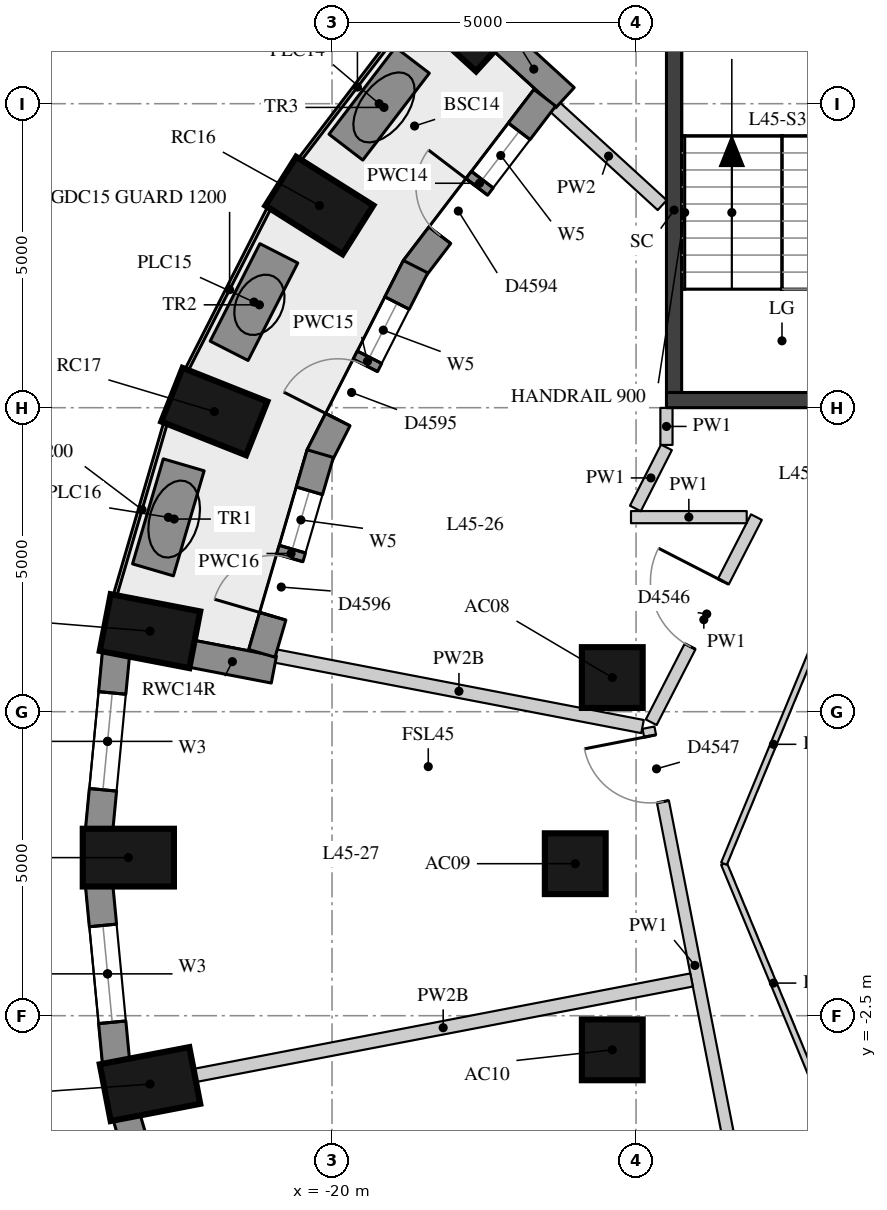
"""IFC4 building model, lengths in metres.
Left out: names, types, materials, properties, quantities, classifications, styles, units other than length and angle.
Written with IfcOpenShell. Run it as: python <this file> out.ifc"""

import sys

from ifc_helpers import new_model, si_unit, direction, frame, frame_2d, origin, origin_2d, place, context, subcontext, project, spatial, rectangle, extrude, element, fill, save


model = new_model("IFC4")
c1 = context("Model", 3, precision=1e-05, world=origin(), true_north=direction((0.0, 1.0)))
c2 = subcontext(c1, "Body", "Model", "MODEL_VIEW")
j1 = project(units=[si_unit("LENGTHUNIT", "METRE"), si_unit("PLANEANGLEUNIT", "RADIAN")], contexts=[c1])
p1 = place(None, origin())
s1 = spatial("IfcSite", under=j1, at=p1, CompositionType="ELEMENT")
p2 = place(p1, origin())
s2 = spatial("IfcBuilding", under=s1, at=p2, CompositionType="ELEMENT")
p3 = place(p2, frame((0.0, 0.0, 161.6)))
s3 = spatial("IfcBuildingStorey", under=s2, at=p3, CompositionType="ELEMENT", Elevation=161.6)
for number, where, z_axis, x_axis in (
    (1, (-17.864, 13.888, 0.0), (0.0, 0.0, 1.0), (-0.738, 0.675, 0.0)),
    (2, (-20.208, 10.825, 0.0), (0.0, 0.0, 1.0), (-0.846, 0.533, 0.0)),
    (3, (-21.936, 7.436, 0.0), (0.0, 0.0, 1.0), (-0.93, 0.369, 0.0)),
    (4, (-22.994, 3.825, 0.0), (0.0, 0.0, 1.0), (-0.982, 0.189, 0.0)),
    (5, (-23.35, 0.1, 0.0), (0.0, 0.0, 1.0), (-1.0, 0.0, 0.0)),
    (6, (-22.994, -3.625, 0.0), (0.0, 0.0, 1.0), (-0.982, -0.189, 0.0)),
):
    element("IfcColumn", number, at=place(p3, frame(where, z_axis=z_axis, x_axis=x_axis)), inside=s3, PredefinedType="COLUMN", context=c2, shape_type="SweptSolid", body=[
        extrude(rectangle(XDim=1.5, YDim=0.95, at=origin_2d()), origin(), (0.0, 0.0, 1.0), 3.3),
    ])
for number, where, z_axis, x_axis in (
    (7, (-15.391, 3.062, 0.0), (0.0, 0.0, 1.0), (1.0, 0.0, 0.0)),
    (8, (-16.0, 0.0, 0.0), (0.0, 0.0, 1.0), (1.0, 0.0, 0.0)),
    (9, (-15.391, -3.062, 0.0), (0.0, 0.0, 1.0), (1.0, 0.0, 0.0)),
):
    element("IfcColumn", number, at=place(p3, frame(where, z_axis=z_axis, x_axis=x_axis)), inside=s3, PredefinedType="COLUMN", context=c2, shape_type="SweptSolid", body=[
        extrude(rectangle(XDim=1.0, YDim=1.0, at=origin_2d()), origin(), (0.0, 0.0, 1.0), 3.3),
    ])
p4 = place(p3, frame((-23.552, 3.469, 0.0), z_axis=(0.0, 0.0, 1.0), x_axis=(-0.095265737322, -0.995451876935, 0.0)))
e10 = element("IfcWall", 10, at=p4, inside=s3, PredefinedType="SOLIDWALL", context=c2, shape_type="SweptSolid", body=[
    extrude(rectangle(XDim=2.927, YDim=0.45, at=frame_2d((1.463, 0.0))), origin(), (0.0, 0.0, 1.0), 3.02),
])
p5 = place(p4, frame((0.663, 0.0, 0.4)))
e11 = element("IfcOpeningElement", 11, at=p5, cuts=e10, PredefinedType="OPENING", context=c2, shape_type="SweptSolid", body=[
    extrude(rectangle(XDim=1.6, YDim=1.75, at=frame_2d((0.8, 0.875))), frame((0.0, 0.235, 0.0), z_axis=(0.0, -1.0, 0.0), x_axis=(1.0, 0.0, 0.0)), (0.0, 0.0, 1.0), 0.47),
])
p6 = place(p3, frame((-23.831, -0.355, 0.0), z_axis=(0.0, 0.0, 1.0), x_axis=(0.095257827044, -0.995452633924, 0.0)))
e12 = element("IfcWall", 12, at=p6, inside=s3, PredefinedType="SOLIDWALL", context=c2, shape_type="SweptSolid", body=[
    extrude(rectangle(XDim=2.927, YDim=0.45, at=frame_2d((1.463, 0.0))), origin(), (0.0, 0.0, 1.0), 3.02),
])
p7 = place(p6, frame((0.663, 0.0, 0.4)))
e13 = element("IfcOpeningElement", 13, at=p7, cuts=e12, PredefinedType="OPENING", context=c2, shape_type="SweptSolid", body=[
    extrude(rectangle(XDim=1.6, YDim=1.75, at=frame_2d((0.8, 0.875))), frame((0.0, 0.235, 0.0), z_axis=(0.0, -1.0, 0.0), x_axis=(1.0, 0.0, 0.0)), (0.0, 0.0, 1.0), 0.47),
])
p8 = place(p3, frame((-23.38, -4.162, 0.0), z_axis=(0.0, 0.0, 1.0), x_axis=(0.281125768296, -0.959670934435, 0.0)))
e14 = element("IfcWall", 14, at=p8, inside=s3, PredefinedType="SOLIDWALL", context=c2, shape_type="SweptSolid", body=[
    extrude(rectangle(XDim=2.948, YDim=0.45, at=frame_2d((1.474, 0.0))), origin(), (0.0, 0.0, 1.0), 3.02),
])
p9 = place(p8, frame((0.674, 0.0, 0.4)))
e15 = element("IfcOpeningElement", 15, at=p9, cuts=e14, PredefinedType="OPENING", context=c2, shape_type="SweptSolid", body=[
    extrude(rectangle(XDim=1.6, YDim=1.75, at=frame_2d((0.8, 0.875))), frame((0.0, 0.235, 0.0), z_axis=(0.0, -1.0, 0.0), x_axis=(1.0, 0.0, 0.0)), (0.0, 0.0, 1.0), 0.47),
])
p10 = place(p3, frame((-17.195, 13.537, 0.0), z_axis=(0.0, 0.0, 1.0), x_axis=(0.737918885826, -0.674889411638, 0.0)))
e16 = element("IfcWall", 16, at=p10, inside=s3, PredefinedType="SOLIDWALL", context=c2, shape_type="SweptSolid", body=[
    extrude(rectangle(XDim=1.391, YDim=0.45, at=frame_2d((0.695, 0.0))), origin(), (0.0, 0.0, 1.0), 3.02),
])
p11 = place(p3, frame((-22.322, 3.455, 0.0), z_axis=(0.0, 0.0, 1.0), x_axis=(0.982051513278, -0.188612897936, 0.0)))
e17 = element("IfcWall", 17, at=p11, inside=s3, PredefinedType="SOLIDWALL", context=c2, shape_type="SweptSolid", body=[
    extrude(rectangle(XDim=1.39, YDim=0.45, at=frame_2d((0.695, 0.0))), origin(), (0.0, 0.0, 1.0), 2.57),
])
p12 = place(p3, frame((-16.501, 12.598, 0.0), z_axis=(0.0, 0.0, 1.0), x_axis=(-0.606778881252, -0.794870674554, 0.0)))
e18 = element("IfcWall", 18, at=p12, inside=s3, PredefinedType="SOLIDWALL", context=c2, shape_type="SweptSolid", body=[
    extrude(rectangle(XDim=3.538, YDim=0.45, at=frame_2d((1.769, 0.0))), origin(), (0.0, 0.0, 1.0), 3.02),
])
p13 = place(p12, frame((0.694, 0.0, 0.4)))
e19 = element("IfcOpeningElement", 19, at=p13, cuts=e18, PredefinedType="OPENING", context=c2, shape_type="SweptSolid", body=[
    extrude(rectangle(XDim=1.0, YDim=1.75, at=frame_2d((0.5, 0.875))), frame((0.0, 0.235, 0.0), z_axis=(0.0, -1.0, 0.0), x_axis=(1.0, 0.0, 0.0)), (0.0, 0.0, 1.0), 0.47),
])
p14 = place(p12, frame((1.844, 0.0, 0.0)))
e20 = element("IfcOpeningElement", 20, at=p14, cuts=e18, PredefinedType="OPENING", context=c2, shape_type="SweptSolid", body=[
    extrude(rectangle(XDim=1.0, YDim=2.15, at=frame_2d((0.5, 1.075))), frame((0.0, 0.235, 0.0), z_axis=(0.0, -1.0, 0.0), x_axis=(1.0, 0.0, 0.0)), (0.0, 0.0, 1.0), 0.47),
])
p15 = place(p3, frame((-18.626, 9.82, 0.0), z_axis=(0.0, 0.0, 1.0), x_axis=(-0.453241970186, -0.891387523169, 0.0)))
e21 = element("IfcWall", 21, at=p15, inside=s3, PredefinedType="SOLIDWALL", context=c2, shape_type="SweptSolid", body=[
    extrude(rectangle(XDim=3.493, YDim=0.45, at=frame_2d((1.747, 0.0))), origin(), (0.0, 0.0, 1.0), 3.02),
])
p16 = place(p15, frame((0.672, 0.0, 0.4)))
e22 = element("IfcOpeningElement", 22, at=p16, cuts=e21, PredefinedType="OPENING", context=c2, shape_type="SweptSolid", body=[
    extrude(rectangle(XDim=1.0, YDim=1.75, at=frame_2d((0.5, 0.875))), frame((0.0, 0.235, 0.0), z_axis=(0.0, -1.0, 0.0), x_axis=(1.0, 0.0, 0.0)), (0.0, 0.0, 1.0), 0.47),
])
p17 = place(p15, frame((1.822, 0.0, 0.0)))
e23 = element("IfcOpeningElement", 23, at=p17, cuts=e21, PredefinedType="OPENING", context=c2, shape_type="SweptSolid", body=[
    extrude(rectangle(XDim=1.0, YDim=2.15, at=frame_2d((0.5, 1.075))), frame((0.0, 0.235, 0.0), z_axis=(0.0, -1.0, 0.0), x_axis=(1.0, 0.0, 0.0)), (0.0, 0.0, 1.0), 0.47),
])
p18 = place(p3, frame((-20.194, 6.745, 0.0), z_axis=(0.0, 0.0, 1.0), x_axis=(-0.280397139934, -0.959884078375, 0.0)))
e24 = element("IfcWall", 24, at=p18, inside=s3, PredefinedType="SOLIDWALL", context=c2, shape_type="SweptSolid", body=[
    extrude(rectangle(XDim=3.423, YDim=0.45, at=frame_2d((1.711, 0.0))), origin(), (0.0, 0.0, 1.0), 3.02),
])
p19 = place(p18, frame((0.636, 0.0, 0.4)))
e25 = element("IfcOpeningElement", 25, at=p19, cuts=e24, PredefinedType="OPENING", context=c2, shape_type="SweptSolid", body=[
    extrude(rectangle(XDim=1.0, YDim=1.75, at=frame_2d((0.5, 0.875))), frame((0.0, 0.235, 0.0), z_axis=(0.0, -1.0, 0.0), x_axis=(1.0, 0.0, 0.0)), (0.0, 0.0, 1.0), 0.47),
])
p20 = place(p18, frame((1.786, 0.0, 0.0)))
e26 = element("IfcOpeningElement", 26, at=p20, cuts=e24, PredefinedType="OPENING", context=c2, shape_type="SweptSolid", body=[
    extrude(rectangle(XDim=1.0, YDim=2.15, at=frame_2d((0.5, 1.075))), frame((0.0, 0.235, 0.0), z_axis=(0.0, -1.0, 0.0), x_axis=(1.0, 0.0, 0.0)), (0.0, 0.0, 1.0), 0.47),
])
for number, where, z_axis, x_axis in (
    (27, (-18.678, 13.214, 0.0), (0.0, 0.0, 1.0), (-0.608, -0.794, 0.0)),
    (28, (-20.875, 10.039, 0.0), (0.0, 0.0, 1.0), (-0.454, -0.891, 0.0)),
):
    element("IfcWall", number, at=place(p3, frame(where, z_axis=z_axis, x_axis=x_axis)), inside=s3, PredefinedType="USERDEFINED", context=c2, shape_type="SweptSolid", body=[
        extrude(rectangle(XDim=1.8, YDim=0.7, at=frame_2d((0.9, 0.0))), origin(), (0.0, 0.0, 1.0), 0.75),
    ])
p21 = place(p3, frame((-22.439, 6.56, 0.0), z_axis=(0.0, 0.0, 1.0), x_axis=(-0.281057212968, -0.959691014358, 0.0)))
e29 = element("IfcWall", 29, at=p21, inside=s3, PredefinedType="USERDEFINED", context=c2, shape_type="SweptSolid", body=[
    extrude(rectangle(XDim=1.8, YDim=0.7, at=frame_2d((0.9, 0.0))), origin(), (0.0, 0.0, 1.0), 0.75),
])
p22 = place(p3, frame((-14.375, 7.75, -0.28), z_axis=(0.0, 0.0, 1.0), x_axis=(0.0, 1.0, 0.0)))
e30 = element("IfcWall", 30, at=p22, inside=s3, PredefinedType="SHEAR", context=c2, shape_type="SweptSolid", body=[
    extrude(rectangle(XDim=6.0, YDim=0.25, at=frame_2d((3.0, 0.0))), origin(), (0.0, 0.0, 1.0), 3.3),
])
p23 = place(p3, frame((-14.5, 7.625, -0.28), z_axis=(0.0, 0.0, 1.0), x_axis=(1.0, 0.0, 0.0)))
e31 = element("IfcWall", 31, at=p23, inside=s3, PredefinedType="SHEAR", context=c2, shape_type="SweptSolid", body=[
    extrude(rectangle(XDim=5.2, YDim=0.25, at=frame_2d((2.6, 0.0))), origin(), (0.0, 0.0, 1.0), 3.3),
])
p24 = place(p3, frame((-13.268, -5.583, 0.0), z_axis=(0.0, 0.0, 1.0), x_axis=(-0.191747927029, 0.981444207523, 0.0)))
e32 = element("IfcWall", 32, at=p24, inside=s3, PredefinedType="PARTITIONING", context=c2, shape_type="SweptSolid", body=[
    extrude(rectangle(XDim=7.968, YDim=0.2, at=frame_2d((3.984, 0.0))), origin(), (0.0, 0.0, 1.0), 3.02),
])
p25 = place(p24, frame((6.728, 0.0, 0.0)))
e33 = element("IfcOpeningElement", 33, at=p25, cuts=e32, PredefinedType="OPENING", context=c2, shape_type="SweptSolid", body=[
    extrude(rectangle(XDim=1.1, YDim=2.1, at=frame_2d((0.55, 1.05))), frame((0.0, 0.11, 0.0), z_axis=(0.0, -1.0, 0.0), x_axis=(1.0, 0.0, 0.0)), (0.0, 0.0, 1.0), 0.22),
])
p26 = place(p3, frame((-14.751, 2.326, 0.0), z_axis=(0.0, 0.0, 1.0), x_axis=(0.456461745611, 0.889743038632, 0.0)))
e34 = element("IfcWall", 34, at=p26, inside=s3, PredefinedType="PARTITIONING", context=c2, shape_type="SweptSolid", body=[
    extrude(rectangle(XDim=3.792, YDim=0.2, at=frame_2d((1.896, 0.0))), origin(), (0.0, 0.0, 1.0), 3.02),
])
p27 = place(p26, frame((1.401, 0.0, 0.0)))
e35 = element("IfcOpeningElement", 35, at=p27, cuts=e34, PredefinedType="OPENING", context=c2, shape_type="SweptSolid", body=[
    extrude(rectangle(XDim=1.2, YDim=2.1, at=frame_2d((0.6, 1.05))), frame((0.0, 0.11, 0.0), z_axis=(0.0, -1.0, 0.0), x_axis=(1.0, 0.0, 0.0)), (0.0, 0.0, 1.0), 0.22),
])
p28 = place(p3, frame((-13.18, 5.7, 0.0), z_axis=(0.0, 0.0, 1.0), x_axis=(-1.0, 0.0, 0.0)))
e36 = element("IfcWall", 36, at=p28, inside=s3, PredefinedType="PARTITIONING", context=c2, shape_type="SweptSolid", body=[
    extrude(rectangle(XDim=1.903, YDim=0.2, at=frame_2d((0.952, 0.0))), origin(), (0.0, 0.0, 1.0), 3.02),
])
p29 = place(p3, frame((-15.011, 5.843, 0.0), z_axis=(0.0, 0.0, 1.0), x_axis=(0.453267091839, 0.891374749169, 0.0)))
e37 = element("IfcWall", 37, at=p29, inside=s3, PredefinedType="PARTITIONING", context=c2, shape_type="SweptSolid", body=[
    extrude(rectangle(XDim=1.127, YDim=0.2, at=frame_2d((0.564, 0.0))), origin(), (0.0, 0.0, 1.0), 3.02),
])
p30 = place(p3, frame((-14.5, 6.887, 0.0), z_axis=(0.0, 0.0, 1.0), x_axis=(0.0, 1.0, 0.0)))
e38 = element("IfcWall", 38, at=p30, inside=s3, PredefinedType="PARTITIONING", context=c2, shape_type="SweptSolid", body=[
    extrude(rectangle(XDim=0.609, YDim=0.2, at=frame_2d((0.304, 0.0))), origin(), (0.0, 0.0, 1.0), 3.02),
])
p31 = place(p3, frame((-16.334, 12.445, 0.0), z_axis=(0.0, 0.0, 1.0), x_axis=(0.737857346278, -0.674956692347, 0.0)))
e39 = element("IfcWall", 39, at=p31, inside=s3, PredefinedType="PARTITIONING", context=c2, shape_type="SweptSolid", body=[
    extrude(rectangle(XDim=2.391, YDim=0.22, at=frame_2d((1.195, 0.0))), origin(), (0.0, 0.0, 1.0), 3.02),
])
p32 = place(p3, frame((-20.932, 3.417, 0.0), z_axis=(0.0, 0.0, 1.0), x_axis=(0.9820075798, -0.188841502892, 0.0)))
e40 = element("IfcWall", 40, at=p32, inside=s3, PredefinedType="PARTITIONING", context=c2, shape_type="SweptSolid", body=[
    extrude(rectangle(XDim=6.149, YDim=0.22, at=frame_2d((3.074, 0.0))), origin(), (0.0, 0.0, 1.0), 2.57),
])
p33 = place(p3, frame((-22.257, -3.483, 0.0), z_axis=(0.0, 0.0, 1.0), x_axis=(0.982022559039, 0.188763591666, 0.0)))
e41 = element("IfcWall", 41, at=p33, inside=s3, PredefinedType="PARTITIONING", context=c2, shape_type="SweptSolid", body=[
    extrude(rectangle(XDim=8.32, YDim=0.22, at=frame_2d((4.16, 0.0))), origin(), (0.0, 0.0, 1.0), 2.57),
])
for number, where, z_axis, x_axis in (
    (42, (-11.927, -3.927, 0.0), (0.0, 0.0, 1.0), (-0.383, 0.924, 0.0)),
    (43, (-13.554, 0.0, 0.0), (0.0, 0.0, 1.0), (0.383, 0.924, 0.0)),
):
    element("IfcWall", number, at=place(p3, frame(where, z_axis=z_axis, x_axis=x_axis)), inside=s3, PredefinedType="PARTITIONING", context=c2, shape_type="SweptSolid", body=[
        extrude(rectangle(XDim=4.251, YDim=0.1, at=frame_2d((2.125, 0.0))), origin(), (0.0, 0.0, 1.0), 3.02),
    ])
p34 = place(p5, origin())
e44 = element("IfcWindow", 44, at=p34, inside=s3, PartitioningType="SINGLE_PANEL", PredefinedType="WINDOW", context=c2, shape_type="SweptSolid", body=[
    extrude(rectangle(XDim=1.6, YDim=1.75, at=frame_2d((0.8, 0.875))), frame((0.0, 0.035, 0.0), z_axis=(0.0, -1.0, 0.0), x_axis=(1.0, 0.0, 0.0)), (0.0, 0.0, 1.0), 0.06),
])
fill(e11, e44)
p35 = place(p7, origin())
e45 = element("IfcWindow", 45, at=p35, inside=s3, PartitioningType="SINGLE_PANEL", PredefinedType="WINDOW", context=c2, shape_type="SweptSolid", body=[
    extrude(rectangle(XDim=1.6, YDim=1.75, at=frame_2d((0.8, 0.875))), frame((0.0, 0.035, 0.0), z_axis=(0.0, -1.0, 0.0), x_axis=(1.0, 0.0, 0.0)), (0.0, 0.0, 1.0), 0.06),
])
fill(e13, e45)
p36 = place(p13, origin())
e46 = element("IfcWindow", 46, at=p36, inside=s3, PartitioningType="SINGLE_PANEL", PredefinedType="WINDOW", context=c2, shape_type="SweptSolid", body=[
    extrude(rectangle(XDim=1.0, YDim=1.75, at=frame_2d((0.5, 0.875))), frame((0.0, 0.035, 0.0), z_axis=(0.0, -1.0, 0.0), x_axis=(1.0, 0.0, 0.0)), (0.0, 0.0, 1.0), 0.06),
])
fill(e19, e46)
p37 = place(p14, frame((1.0, 0.0, 0.0), z_axis=(0.0, 0.0, 1.0), x_axis=(-1.0, 0.0, 0.0)))
e47 = element("IfcDoor", 47, at=p37, inside=s3, OperationType="SINGLE_SWING_RIGHT", PredefinedType="DOOR", context=c2, shape_type="SweptSolid", body=[
    extrude(rectangle(XDim=1.0, YDim=2.15, at=frame_2d((0.5, 1.075))), frame((0.0, 0.075, 0.0), z_axis=(0.0, -1.0, 0.0), x_axis=(1.0, 0.0, 0.0)), (0.0, 0.0, 1.0), 0.05),
])
fill(e20, e47)
p38 = place(p16, origin())
e48 = element("IfcWindow", 48, at=p38, inside=s3, PartitioningType="SINGLE_PANEL", PredefinedType="WINDOW", context=c2, shape_type="SweptSolid", body=[
    extrude(rectangle(XDim=1.0, YDim=1.75, at=frame_2d((0.5, 0.875))), frame((0.0, 0.035, 0.0), z_axis=(0.0, -1.0, 0.0), x_axis=(1.0, 0.0, 0.0)), (0.0, 0.0, 1.0), 0.06),
])
fill(e22, e48)
p39 = place(p17, frame((1.0, 0.0, 0.0), z_axis=(0.0, 0.0, 1.0), x_axis=(-1.0, 0.0, 0.0)))
e49 = element("IfcDoor", 49, at=p39, inside=s3, OperationType="SINGLE_SWING_LEFT", PredefinedType="DOOR", context=c2, shape_type="SweptSolid", body=[
    extrude(rectangle(XDim=1.0, YDim=2.15, at=frame_2d((0.5, 1.075))), frame((0.0, 0.075, 0.0), z_axis=(0.0, -1.0, 0.0), x_axis=(1.0, 0.0, 0.0)), (0.0, 0.0, 1.0), 0.05),
])
fill(e23, e49)
p40 = place(p19, origin())
e50 = element("IfcWindow", 50, at=p40, inside=s3, PartitioningType="SINGLE_PANEL", PredefinedType="WINDOW", context=c2, shape_type="SweptSolid", body=[
    extrude(rectangle(XDim=1.0, YDim=1.75, at=frame_2d((0.5, 0.875))), frame((0.0, 0.035, 0.0), z_axis=(0.0, -1.0, 0.0), x_axis=(1.0, 0.0, 0.0)), (0.0, 0.0, 1.0), 0.06),
])
fill(e25, e50)
p41 = place(p20, frame((1.0, 0.0, 0.0), z_axis=(0.0, 0.0, 1.0), x_axis=(-1.0, 0.0, 0.0)))
e51 = element("IfcDoor", 51, at=p41, inside=s3, OperationType="SINGLE_SWING_LEFT", PredefinedType="DOOR", context=c2, shape_type="SweptSolid", body=[
    extrude(rectangle(XDim=1.0, YDim=2.15, at=frame_2d((0.5, 1.075))), frame((0.0, 0.075, 0.0), z_axis=(0.0, -1.0, 0.0), x_axis=(1.0, 0.0, 0.0)), (0.0, 0.0, 1.0), 0.05),
])
fill(e26, e51)
p42 = place(p27, origin())
e52 = element("IfcDoor", 52, at=p42, inside=s3, OperationType="SINGLE_SWING_RIGHT", PredefinedType="DOOR", context=c2, shape_type="SweptSolid", body=[
    extrude(rectangle(XDim=1.2, YDim=2.1, at=frame_2d((0.6, 1.05))), frame((0.0, 0.025, 0.0), z_axis=(0.0, -1.0, 0.0), x_axis=(1.0, 0.0, 0.0)), (0.0, 0.0, 1.0), 0.05),
])
fill(e35, e52)
p43 = place(p25, origin())
e53 = element("IfcDoor", 53, at=p43, inside=s3, OperationType="SINGLE_SWING_RIGHT", PredefinedType="DOOR", context=c2, shape_type="SweptSolid", body=[
    extrude(rectangle(XDim=1.1, YDim=2.1, at=frame_2d((0.55, 1.05))), frame((0.0, 0.025, 0.0), z_axis=(0.0, -1.0, 0.0), x_axis=(1.0, 0.0, 0.0)), (0.0, 0.0, 1.0), 0.05),
])
fill(e33, e53)
save(model, sys.argv[1])
